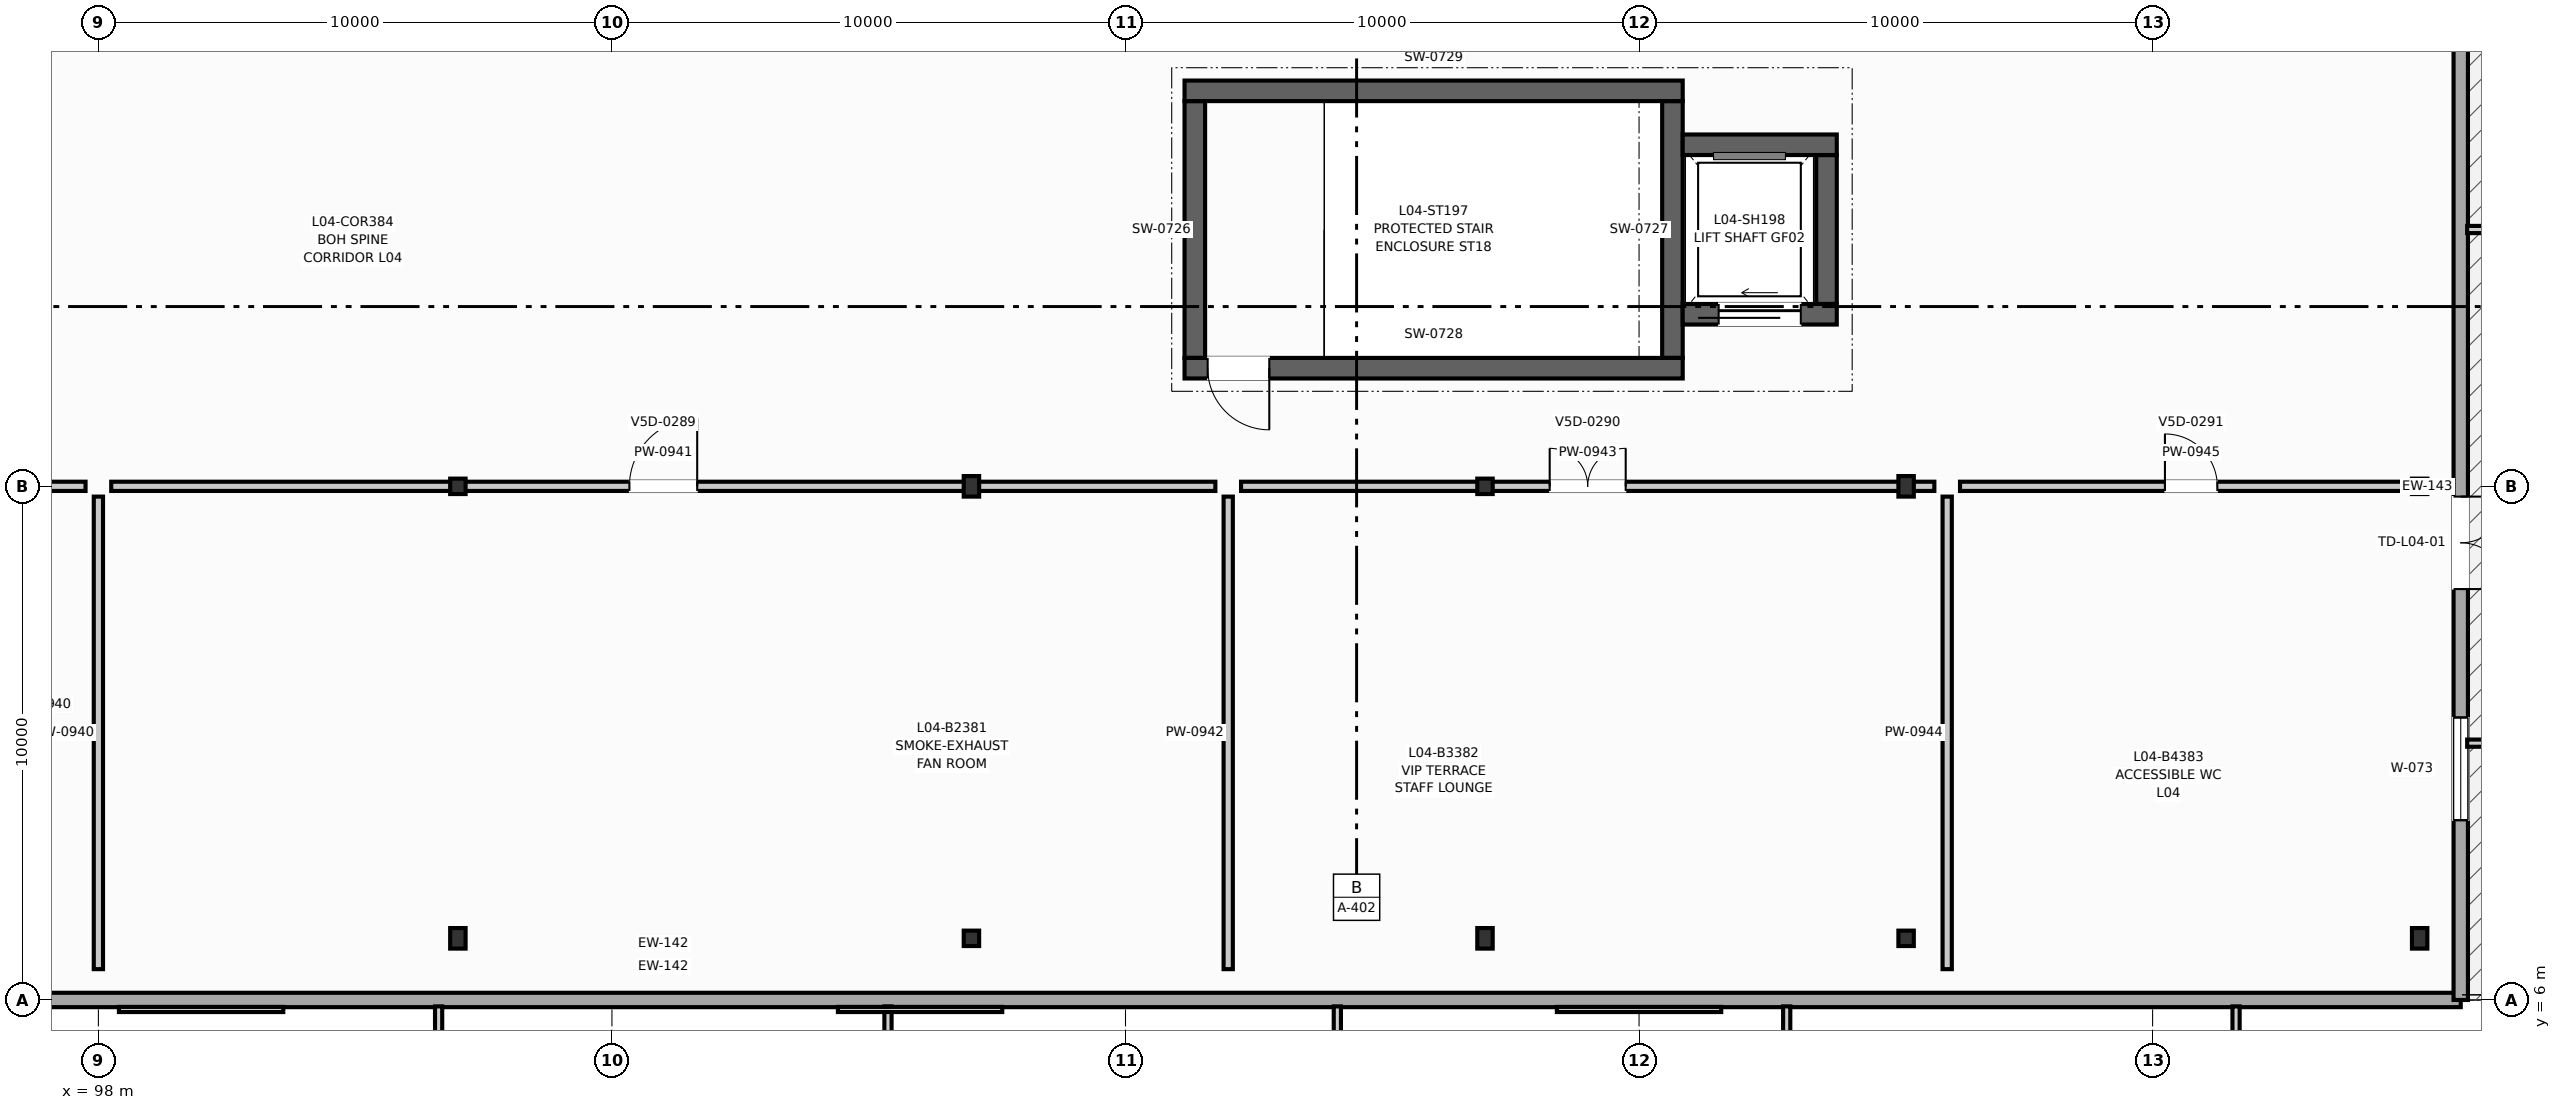
"""IFC4 building model, lengths in metres.
Left out: names, types, materials, properties, quantities, classifications, styles, units other than length and angle.
Written with IfcOpenShell. Run it as: python <this file> out.ifc"""

import sys

from ifc_helpers import new_model, si_unit, direction, frame, frame_2d, origin, origin_2d, place, context, subcontext, project, spatial, rectangle, i_section, extrude, element, fill, save


model = new_model("IFC4")
c1 = context("Model", 3, precision=1e-05, world=origin(), true_north=direction((0.0, 1.0)))
c2 = subcontext(c1, "Body", "Model", "MODEL_VIEW")
j1 = project(units=[si_unit("LENGTHUNIT", "METRE"), si_unit("PLANEANGLEUNIT", "RADIAN")], contexts=[c1])
p1 = place(None, origin())
s1 = spatial("IfcSite", under=j1, at=p1, CompositionType="ELEMENT")
p2 = place(p1, origin())
s2 = spatial("IfcBuilding", under=s1, at=p2, CompositionType="ELEMENT")
p3 = place(p2, frame((0.0, 0.0, 18.0)))
s3 = spatial("IfcBuildingStorey", under=s2, at=p3, CompositionType="ELEMENT", Elevation=18.0)
p4 = place(p3, frame((105.0, 7.2, 0.0), z_axis=(0.0, 0.0, 1.0), x_axis=(1.0, 0.0, 0.0)))
e1 = element("IfcColumn", 1, at=p4, inside=s3, PredefinedType="COLUMN", context=c2, shape_type="SweptSolid", body=[
    extrude(i_section(OverallWidth=0.3, OverallDepth=0.4, WebThickness=0.013, FlangeThickness=0.024, at=origin_2d()), origin(), (0.0, 0.0, 1.0), 4.5),
])
for number, where, z_axis, x_axis in (
    (2, (105.0, 16.0, 0.0), (0.0, 0.0, 1.0), (1.0, 0.0, 0.0)),
    (3, (115.0, 7.2, 0.0), (0.0, 0.0, 1.0), (1.0, 0.0, 0.0)),
):
    element("IfcColumn", number, at=place(p3, frame(where, z_axis=z_axis, x_axis=x_axis)), inside=s3, PredefinedType="COLUMN", context=c2, shape_type="SweptSolid", body=[
        extrude(i_section(OverallWidth=0.3, OverallDepth=0.3, WebThickness=0.011, FlangeThickness=0.019, at=origin_2d()), origin(), (0.0, 0.0, 1.0), 4.5),
    ])
for number, where, z_axis, x_axis in (
    (4, (115.0, 16.0, 0.0), (0.0, 0.0, 1.0), (1.0, 0.0, 0.0)),
    (5, (125.0, 7.2, 0.0), (0.0, 0.0, 1.0), (1.0, 0.0, 0.0)),
):
    element("IfcColumn", number, at=place(p3, frame(where, z_axis=z_axis, x_axis=x_axis)), inside=s3, PredefinedType="COLUMN", context=c2, shape_type="SweptSolid", body=[
        extrude(i_section(OverallWidth=0.3, OverallDepth=0.4, WebThickness=0.013, FlangeThickness=0.024, at=origin_2d()), origin(), (0.0, 0.0, 1.0), 4.5),
    ])
for number, where, z_axis, x_axis in (
    (6, (125.0, 16.0, 0.0), (0.0, 0.0, 1.0), (1.0, 0.0, 0.0)),
    (7, (133.2, 7.2, 0.0), (0.0, 0.0, 1.0), (1.0, 0.0, 0.0)),
):
    element("IfcColumn", number, at=place(p3, frame(where, z_axis=z_axis, x_axis=x_axis)), inside=s3, PredefinedType="COLUMN", context=c2, shape_type="SweptSolid", body=[
        extrude(i_section(OverallWidth=0.3, OverallDepth=0.3, WebThickness=0.011, FlangeThickness=0.019, at=origin_2d()), origin(), (0.0, 0.0, 1.0), 4.5),
    ])
for number, where, z_axis, x_axis in (
    (8, (133.2, 16.0, 0.0), (0.0, 0.0, 1.0), (1.0, 0.0, 0.0)),
    (9, (143.2, 7.2, 0.0), (0.0, 0.0, 1.0), (1.0, 0.0, 0.0)),
):
    element("IfcColumn", number, at=place(p3, frame(where, z_axis=z_axis, x_axis=x_axis)), inside=s3, PredefinedType="COLUMN", context=c2, shape_type="SweptSolid", body=[
        extrude(i_section(OverallWidth=0.3, OverallDepth=0.4, WebThickness=0.013, FlangeThickness=0.024, at=origin_2d()), origin(), (0.0, 0.0, 1.0), 4.5),
    ])
p5 = place(p3, frame((143.2, 16.0, 0.0), z_axis=(0.0, 0.0, 1.0), x_axis=(1.0, 0.0, 0.0)))
e10 = element("IfcColumn", 10, at=p5, inside=s3, PredefinedType="COLUMN", context=c2, shape_type="SweptSolid", body=[
    extrude(i_section(OverallWidth=0.3, OverallDepth=0.3, WebThickness=0.011, FlangeThickness=0.019, at=origin_2d()), origin(), (0.0, 0.0, 1.0), 4.5),
])
p6 = place(p3, frame((74.0, 6.0, 0.0), z_axis=(0.0, 0.0, 1.0), x_axis=(1.0, 0.0, 0.0)))
e11 = element("IfcWall", 11, at=p6, inside=s3, PredefinedType="SOLIDWALL", context=c2, shape_type="SweptSolid", body=[
    extrude(rectangle(XDim=70.0, YDim=0.28, at=frame_2d((35.0, 0.0))), origin(), (0.0, 0.0, 1.0), 3.5),
])
p7 = place(p3, frame((144.0, 6.0, 0.0), z_axis=(0.0, 0.0, 1.0), x_axis=(0.0, 1.0, 0.0)))
e12 = element("IfcWall", 12, at=p7, inside=s3, PredefinedType="SOLIDWALL", context=c2, shape_type="SweptSolid", body=[
    extrude(rectangle(XDim=20.0, YDim=0.28, at=frame_2d((10.0, 0.0))), origin(), (0.0, 0.0, 1.0), 3.5),
])
p8 = place(p7, frame((3.5, 0.0, 0.85)))
e13 = element("IfcOpeningElement", 13, at=p8, cuts=e12, PredefinedType="OPENING", context=c2, shape_type="SweptSolid", body=[
    extrude(rectangle(XDim=2.0, YDim=1.6, at=frame_2d((1.0, 0.8))), frame((0.0, 0.15, 0.0), z_axis=(0.0, -1.0, 0.0), x_axis=(1.0, 0.0, 0.0)), (0.0, 0.0, 1.0), 0.3),
])
p9 = place(p7, frame((8.0, 0.0, 0.0)))
e14 = element("IfcOpeningElement", 14, at=p9, cuts=e12, PredefinedType="OPENING", context=c2, shape_type="SweptSolid", body=[
    extrude(rectangle(XDim=1.8, YDim=2.35, at=frame_2d((0.9, 1.175))), frame((0.0, 0.15, 0.0), z_axis=(0.0, -1.0, 0.0), x_axis=(1.0, 0.0, 0.0)), (0.0, 0.0, 1.0), 0.3),
])
for number, where, z_axis, x_axis in (
    (15, (119.35, 18.5, 0.0), (0.0, 0.0, 1.0), (0.0, 1.0, 0.0)),
    (16, (128.65, 18.5, 0.0), (0.0, 0.0, 1.0), (0.0, 1.0, 0.0)),
):
    element("IfcWall", number, at=place(p3, frame(where, z_axis=z_axis, x_axis=x_axis)), inside=s3, PredefinedType="SHEAR", context=c2, shape_type="SweptSolid", body=[
        extrude(rectangle(XDim=5.0, YDim=0.4, at=frame_2d((2.5, 0.0))), origin(), (0.0, 0.0, 1.0), 4.26),
    ])
p10 = place(p3, frame((119.15, 18.3, 0.0), z_axis=(0.0, 0.0, 1.0), x_axis=(1.0, 0.0, 0.0)))
e17 = element("IfcWall", 17, at=p10, inside=s3, PredefinedType="SHEAR", context=c2, shape_type="SweptSolid", body=[
    extrude(rectangle(XDim=9.7, YDim=0.4, at=frame_2d((4.85, 0.0))), origin(), (0.0, 0.0, 1.0), 4.26),
])
p11 = place(p10, frame((0.45, 0.0, 0.0)))
e18 = element("IfcOpeningElement", 18, at=p11, cuts=e17, PredefinedType="OPENING", context=c2, shape_type="SweptSolid", body=[
    extrude(rectangle(XDim=1.2, YDim=2.2, at=frame_2d((0.6, 1.1))), frame((0.0, 0.21, 0.0), z_axis=(0.0, -1.0, 0.0), x_axis=(1.0, 0.0, 0.0)), (0.0, 0.0, 1.0), 0.42),
])
p12 = place(p3, frame((119.15, 23.7, 0.0), z_axis=(0.0, 0.0, 1.0), x_axis=(1.0, 0.0, 0.0)))
e19 = element("IfcWall", 19, at=p12, inside=s3, PredefinedType="SHEAR", context=c2, shape_type="SweptSolid", body=[
    extrude(rectangle(XDim=9.7, YDim=0.4, at=frame_2d((4.85, 0.0))), origin(), (0.0, 0.0, 1.0), 4.26),
])
p13 = place(p3, frame((131.65, 19.55, 0.0), z_axis=(0.0, 0.0, 1.0), x_axis=(0.0, 1.0, 0.0)))
e20 = element("IfcWall", 20, at=p13, inside=s3, PredefinedType="SHEAR", context=c2, shape_type="SweptSolid", body=[
    extrude(rectangle(XDim=2.9, YDim=0.4, at=frame_2d((1.45, 0.0))), origin(), (0.0, 0.0, 1.0), 4.26),
])
p14 = place(p3, frame((128.85, 19.35, 0.0), z_axis=(0.0, 0.0, 1.0), x_axis=(1.0, 0.0, 0.0)))
e21 = element("IfcWall", 21, at=p14, inside=s3, PredefinedType="SHEAR", context=c2, shape_type="SweptSolid", body=[
    extrude(rectangle(XDim=3.0, YDim=0.4, at=frame_2d((1.5, 0.0))), origin(), (0.0, 0.0, 1.0), 4.26),
])
p15 = place(p14, frame((0.7, 0.0, 0.0)))
e22 = element("IfcOpeningElement", 22, at=p15, cuts=e21, PredefinedType="OPENING", context=c2, shape_type="SweptSolid", body=[
    extrude(rectangle(XDim=1.6, YDim=2.35, at=frame_2d((0.8, 1.175))), frame((0.0, 0.21, 0.0), z_axis=(0.0, -1.0, 0.0), x_axis=(1.0, 0.0, 0.0)), (0.0, 0.0, 1.0), 0.42),
])
p16 = place(p3, frame((128.85, 22.65, 0.0), z_axis=(0.0, 0.0, 1.0), x_axis=(1.0, 0.0, 0.0)))
e23 = element("IfcWall", 23, at=p16, inside=s3, PredefinedType="SHEAR", context=c2, shape_type="SweptSolid", body=[
    extrude(rectangle(XDim=3.0, YDim=0.4, at=frame_2d((1.5, 0.0))), origin(), (0.0, 0.0, 1.0), 4.26),
])
p17 = place(p3, frame((76.05, 16.0, 0.0), z_axis=(0.0, 0.0, 1.0), x_axis=(1.0, 0.0, 0.0)))
e24 = element("IfcWall", 24, at=p17, inside=s3, PredefinedType="PARTITIONING", context=c2, shape_type="SweptSolid", body=[
    extrude(rectangle(XDim=21.7, YDim=0.18, at=frame_2d((10.85, 0.0))), origin(), (0.0, 0.0, 1.0), 3.22),
])
p18 = place(p17, frame((10.36, 0.0, 0.0)))
e25 = element("IfcOpeningElement", 25, at=p18, cuts=e24, PredefinedType="OPENING", context=c2, shape_type="SweptSolid", body=[
    extrude(rectangle(XDim=0.98, YDim=2.15, at=frame_2d((0.49, 1.075))), frame((0.0, 0.1, 0.0), z_axis=(0.0, -1.0, 0.0), x_axis=(1.0, 0.0, 0.0)), (0.0, 0.0, 1.0), 0.2),
])
p19 = place(p3, frame((98.0, 6.6, 0.0), z_axis=(0.0, 0.0, 1.0), x_axis=(0.0, 1.0, 0.0)))
e26 = element("IfcWall", 26, at=p19, inside=s3, PredefinedType="PARTITIONING", context=c2, shape_type="SweptSolid", body=[
    extrude(rectangle(XDim=9.2, YDim=0.18, at=frame_2d((4.6, 0.0))), origin(), (0.0, 0.0, 1.0), 3.22),
])
p20 = place(p3, frame((98.25, 16.0, 0.0), z_axis=(0.0, 0.0, 1.0), x_axis=(1.0, 0.0, 0.0)))
e27 = element("IfcWall", 27, at=p20, inside=s3, PredefinedType="PARTITIONING", context=c2, shape_type="SweptSolid", body=[
    extrude(rectangle(XDim=21.5, YDim=0.18, at=frame_2d((10.75, 0.0))), origin(), (0.0, 0.0, 1.0), 3.22),
])
p21 = place(p20, frame((10.09, 0.0, 0.0)))
e28 = element("IfcOpeningElement", 28, at=p21, cuts=e27, PredefinedType="OPENING", context=c2, shape_type="SweptSolid", body=[
    extrude(rectangle(XDim=1.32, YDim=2.22, at=frame_2d((0.66, 1.11))), frame((0.0, 0.1, 0.0), z_axis=(0.0, -1.0, 0.0), x_axis=(1.0, 0.0, 0.0)), (0.0, 0.0, 1.0), 0.2),
])
p22 = place(p3, frame((120.0, 6.6, 0.0), z_axis=(0.0, 0.0, 1.0), x_axis=(0.0, 1.0, 0.0)))
e29 = element("IfcWall", 29, at=p22, inside=s3, PredefinedType="PARTITIONING", context=c2, shape_type="SweptSolid", body=[
    extrude(rectangle(XDim=9.2, YDim=0.18, at=frame_2d((4.6, 0.0))), origin(), (0.0, 0.0, 1.0), 3.22),
])
p23 = place(p3, frame((120.25, 16.0, 0.0), z_axis=(0.0, 0.0, 1.0), x_axis=(1.0, 0.0, 0.0)))
e30 = element("IfcWall", 30, at=p23, inside=s3, PredefinedType="PARTITIONING", context=c2, shape_type="SweptSolid", body=[
    extrude(rectangle(XDim=13.5, YDim=0.18, at=frame_2d((6.75, 0.0))), origin(), (0.0, 0.0, 1.0), 3.22),
])
p24 = place(p23, frame((6.01, 0.0, 0.0)))
e31 = element("IfcOpeningElement", 31, at=p24, cuts=e30, PredefinedType="OPENING", context=c2, shape_type="SweptSolid", body=[
    extrude(rectangle(XDim=1.48, YDim=2.24, at=frame_2d((0.74, 1.12))), frame((0.0, 0.1, 0.0), z_axis=(0.0, -1.0, 0.0), x_axis=(1.0, 0.0, 0.0)), (0.0, 0.0, 1.0), 0.2),
])
p25 = place(p3, frame((134.0, 6.6, 0.0), z_axis=(0.0, 0.0, 1.0), x_axis=(0.0, 1.0, 0.0)))
e32 = element("IfcWall", 32, at=p25, inside=s3, PredefinedType="PARTITIONING", context=c2, shape_type="SweptSolid", body=[
    extrude(rectangle(XDim=9.2, YDim=0.18, at=frame_2d((4.6, 0.0))), origin(), (0.0, 0.0, 1.0), 3.22),
])
p26 = place(p3, frame((134.25, 16.0, 0.0), z_axis=(0.0, 0.0, 1.0), x_axis=(1.0, 0.0, 0.0)))
e33 = element("IfcWall", 33, at=p26, inside=s3, PredefinedType="PARTITIONING", context=c2, shape_type="SweptSolid", body=[
    extrude(rectangle(XDim=9.0, YDim=0.18, at=frame_2d((4.5, 0.0))), origin(), (0.0, 0.0, 1.0), 3.22),
])
p27 = place(p26, frame((3.99, 0.0, 0.0)))
e34 = element("IfcOpeningElement", 34, at=p27, cuts=e33, PredefinedType="OPENING", context=c2, shape_type="SweptSolid", body=[
    extrude(rectangle(XDim=1.02, YDim=2.15, at=frame_2d((0.51, 1.075))), frame((0.0, 0.1, 0.0), z_axis=(0.0, -1.0, 0.0), x_axis=(1.0, 0.0, 0.0)), (0.0, 0.0, 1.0), 0.2),
])
p28 = place(p8, origin())
e35 = element("IfcWindow", 35, at=p28, inside=s3, PartitioningType="SINGLE_PANEL", PredefinedType="WINDOW", context=c2, shape_type="SweptSolid", body=[
    extrude(rectangle(XDim=2.0, YDim=1.6, at=frame_2d((1.0, 0.8))), frame((0.0, 0.03, 0.0), z_axis=(0.0, -1.0, 0.0), x_axis=(1.0, 0.0, 0.0)), (0.0, 0.0, 1.0), 0.06),
])
fill(e13, e35)
p29 = place(p9, frame((1.8, 0.0, 0.0), z_axis=(0.0, 0.0, 1.0), x_axis=(-1.0, 0.0, 0.0)))
e36 = element("IfcDoor", 36, at=p29, inside=s3, OperationType="DOUBLE_DOOR_SINGLE_SWING", PredefinedType="DOOR", context=c2, shape_type="SweptSolid", body=[
    extrude(rectangle(XDim=1.8, YDim=2.35, at=frame_2d((0.9, 1.175))), frame((0.0, 0.025, 0.0), z_axis=(0.0, -1.0, 0.0), x_axis=(1.0, 0.0, 0.0)), (0.0, 0.0, 1.0), 0.05),
])
fill(e14, e36)
p30 = place(p11, frame((1.2, 0.0, 0.0), z_axis=(0.0, 0.0, 1.0), x_axis=(-1.0, 0.0, 0.0)))
e37 = element("IfcDoor", 37, at=p30, inside=s3, OperationType="SINGLE_SWING_RIGHT", PredefinedType="DOOR", context=c2, shape_type="SweptSolid", body=[
    extrude(rectangle(XDim=1.2, YDim=2.2, at=frame_2d((0.6, 1.1))), frame((0.0, 0.025, 0.0), z_axis=(0.0, -1.0, 0.0), x_axis=(1.0, 0.0, 0.0)), (0.0, 0.0, 1.0), 0.05),
])
fill(e18, e37)
p31 = place(p15, origin())
e38 = element("IfcDoor", 38, at=p31, inside=s3, OperationType="SLIDING_TO_LEFT", PredefinedType="DOOR", context=c2, shape_type="SweptSolid", body=[
    extrude(rectangle(XDim=1.6, YDim=2.35, at=frame_2d((0.8, 1.175))), frame((0.0, 0.025, 0.0), z_axis=(0.0, -1.0, 0.0), x_axis=(1.0, 0.0, 0.0)), (0.0, 0.0, 1.0), 0.05),
])
fill(e22, e38)
p32 = place(p21, origin())
e39 = element("IfcDoor", 39, at=p32, inside=s3, OperationType="SINGLE_SWING_RIGHT", PredefinedType="DOOR", context=c2, shape_type="SweptSolid", body=[
    extrude(rectangle(XDim=1.32, YDim=2.22, at=frame_2d((0.66, 1.11))), frame((0.0, 0.025, 0.0), z_axis=(0.0, -1.0, 0.0), x_axis=(1.0, 0.0, 0.0)), (0.0, 0.0, 1.0), 0.05),
])
fill(e28, e39)
p33 = place(p24, origin())
e40 = element("IfcDoor", 40, at=p33, inside=s3, OperationType="DOUBLE_DOOR_SINGLE_SWING", PredefinedType="DOOR", context=c2, shape_type="SweptSolid", body=[
    extrude(rectangle(XDim=1.48, YDim=2.24, at=frame_2d((0.74, 1.12))), frame((0.0, 0.025, 0.0), z_axis=(0.0, -1.0, 0.0), x_axis=(1.0, 0.0, 0.0)), (0.0, 0.0, 1.0), 0.05),
])
fill(e31, e40)
p34 = place(p27, origin())
e41 = element("IfcDoor", 41, at=p34, inside=s3, OperationType="SINGLE_SWING_LEFT", PredefinedType="DOOR", context=c2, shape_type="SweptSolid", body=[
    extrude(rectangle(XDim=1.02, YDim=2.15, at=frame_2d((0.51, 1.075))), frame((0.0, 0.025, 0.0), z_axis=(0.0, -1.0, 0.0), x_axis=(1.0, 0.0, 0.0)), (0.0, 0.0, 1.0), 0.05),
])
fill(e34, e41)
save(model, sys.argv[1])
